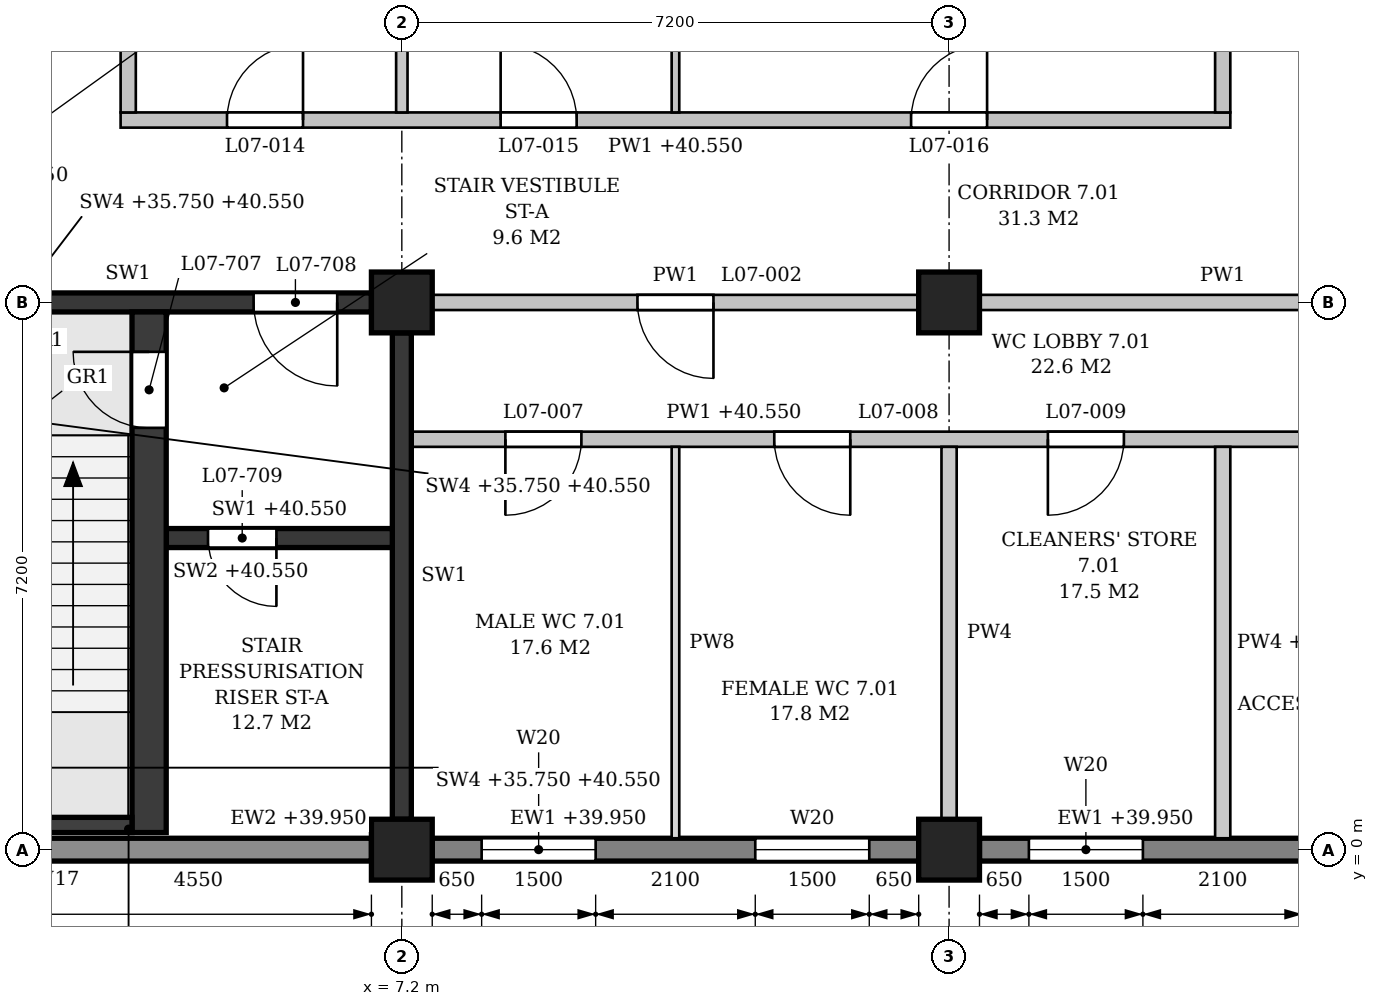
"""IFC4 building model, lengths in metres.
Left out: names, types, materials, properties, quantities, classifications, styles, units other than length and angle.
Written with IfcOpenShell. Run it as: python <this file> out.ifc"""

import sys

from ifc_helpers import new_model, si_unit, direction, frame, frame_2d, origin, origin_2d, place, context, subcontext, project, spatial, polyline, rectangle, outline, extrude, element, fill, save


model = new_model("IFC4")
c1 = context("Model", 3, precision=1e-05, world=origin(), true_north=direction((0.0, 1.0)))
c2 = subcontext(c1, "Body", "Model", "MODEL_VIEW")
j1 = project(units=[si_unit("LENGTHUNIT", "METRE"), si_unit("PLANEANGLEUNIT", "RADIAN")], contexts=[c1])
p1 = place(None, origin())
s1 = spatial("IfcSite", under=j1, at=p1, CompositionType="ELEMENT")
p2 = place(p1, origin())
s2 = spatial("IfcBuilding", under=s1, at=p2, CompositionType="ELEMENT")
p3 = place(p2, frame((0.0, 0.0, 36.0)))
s3 = spatial("IfcBuildingStorey", under=s2, at=p3, CompositionType="ELEMENT", Elevation=36.0)
for number, where, z_axis, x_axis in (
    (1, (7.2, 0.0, 0.0), (0.0, 0.0, 1.0), (1.0, 0.0, 0.0)),
    (2, (7.2, 7.2, 0.0), (0.0, 0.0, 1.0), (1.0, 0.0, 0.0)),
    (3, (14.4, 0.0, 0.0), (0.0, 0.0, 1.0), (1.0, 0.0, 0.0)),
    (4, (14.4, 7.2, 0.0), (0.0, 0.0, 1.0), (1.0, 0.0, 0.0)),
):
    element("IfcColumn", number, at=place(p3, frame(where, z_axis=z_axis, x_axis=x_axis)), inside=s3, PredefinedType="COLUMN", context=c2, shape_type="SweptSolid", body=[
        extrude(rectangle(XDim=0.8, YDim=0.8, at=origin_2d()), origin(), (0.0, 0.0, 1.0), 4.8),
    ])
p4 = place(p3, frame((0.4, 0.0, 0.0), z_axis=(0.0, 0.0, 1.0), x_axis=(1.0, 0.0, 0.0)))
e5 = element("IfcWall", 5, at=p4, inside=s3, PredefinedType="STANDARD", context=c2, shape_type="SweptSolid", body=[
    extrude(rectangle(XDim=6.4, YDim=0.3, at=frame_2d((3.2, 0.0))), origin(), (0.0, 0.0, 1.0), 3.95),
])
p5 = place(p4, frame((0.95, 0.0, 0.9)))
e6 = element("IfcOpeningElement", 6, at=p5, cuts=e5, PredefinedType="OPENING", context=c2, shape_type="SweptSolid", body=[
    extrude(outline(polyline([(0.0, 0.0), (0.9, 0.0), (0.9, 2.55), (0.45, 3.0), (0.0, 2.55), (0.0, 0.0)])), frame((0.0, 0.16, 0.0), z_axis=(0.0, -1.0, 0.0), x_axis=(1.0, 0.0, 0.0)), (0.0, 0.0, 1.0), 0.32),
])
p6 = place(p3, frame((7.6, 0.0, 0.0), z_axis=(0.0, 0.0, 1.0), x_axis=(1.0, 0.0, 0.0)))
e7 = element("IfcWall", 7, at=p6, inside=s3, PredefinedType="STANDARD", context=c2, shape_type="SweptSolid", body=[
    extrude(rectangle(XDim=6.4, YDim=0.3, at=frame_2d((3.2, 0.0))), origin(), (0.0, 0.0, 1.0), 3.95),
])
p7 = place(p6, frame((0.65, 0.0, 0.9)))
e8 = element("IfcOpeningElement", 8, at=p7, cuts=e7, PredefinedType="OPENING", context=c2, shape_type="SweptSolid", body=[
    extrude(outline(polyline([(0.0, 0.0), (1.5, 0.0), (1.5, 2.25), (0.75, 3.0), (0.0, 2.25), (0.0, 0.0)])), frame((0.0, 0.16, 0.0), z_axis=(0.0, -1.0, 0.0), x_axis=(1.0, 0.0, 0.0)), (0.0, 0.0, 1.0), 0.32),
])
p8 = place(p6, frame((4.25, 0.0, 0.9)))
e9 = element("IfcOpeningElement", 9, at=p8, cuts=e7, PredefinedType="OPENING", context=c2, shape_type="SweptSolid", body=[
    extrude(outline(polyline([(0.0, 0.0), (1.5, 0.0), (1.5, 2.25), (0.75, 3.0), (0.0, 2.25), (0.0, 0.0)])), frame((0.0, 0.16, 0.0), z_axis=(0.0, -1.0, 0.0), x_axis=(1.0, 0.0, 0.0)), (0.0, 0.0, 1.0), 0.32),
])
p9 = place(p3, frame((14.8, 0.0, 0.0), z_axis=(0.0, 0.0, 1.0), x_axis=(1.0, 0.0, 0.0)))
e10 = element("IfcWall", 10, at=p9, inside=s3, PredefinedType="STANDARD", context=c2, shape_type="SweptSolid", body=[
    extrude(rectangle(XDim=6.4, YDim=0.3, at=frame_2d((3.2, 0.0))), origin(), (0.0, 0.0, 1.0), 3.95),
])
p10 = place(p9, frame((0.65, 0.0, 0.9)))
e11 = element("IfcOpeningElement", 11, at=p10, cuts=e10, PredefinedType="OPENING", context=c2, shape_type="SweptSolid", body=[
    extrude(outline(polyline([(0.0, 0.0), (1.5, 0.0), (1.5, 2.25), (0.75, 3.0), (0.0, 2.25), (0.0, 0.0)])), frame((0.0, 0.16, 0.0), z_axis=(0.0, -1.0, 0.0), x_axis=(1.0, 0.0, 0.0)), (0.0, 0.0, 1.0), 0.32),
])
p11 = place(p9, frame((4.25, 0.0, 0.9)))
e12 = element("IfcOpeningElement", 12, at=p11, cuts=e10, PredefinedType="OPENING", context=c2, shape_type="SweptSolid", body=[
    extrude(outline(polyline([(0.0, 0.0), (1.5, 0.0), (1.5, 2.25), (0.75, 3.0), (0.0, 2.25), (0.0, 0.0)])), frame((0.0, 0.16, 0.0), z_axis=(0.0, -1.0, 0.0), x_axis=(1.0, 0.0, 0.0)), (0.0, 0.0, 1.0), 0.32),
])
p12 = place(p3, frame((0.4, 7.2, 0.0), z_axis=(0.0, 0.0, 1.0), x_axis=(1.0, 0.0, 0.0)))
e13 = element("IfcWall", 13, at=p12, inside=s3, PredefinedType="SHEAR", context=c2, shape_type="SweptSolid", body=[
    extrude(rectangle(XDim=6.4, YDim=0.25, at=frame_2d((3.2, 0.0))), origin(), (0.0, 0.0, 1.0), 3.85),
])
p13 = place(p12, frame((4.85, 0.0, 0.0)))
e14 = element("IfcOpeningElement", 14, at=p13, cuts=e13, PredefinedType="OPENING", context=c2, shape_type="SweptSolid", body=[
    extrude(rectangle(XDim=1.1, YDim=2.1, at=frame_2d((0.55, 1.05))), frame((0.0, 0.135, 0.0), z_axis=(0.0, -1.0, 0.0), x_axis=(1.0, 0.0, 0.0)), (0.0, 0.0, 1.0), 0.27),
])
p14 = place(p3, frame((7.2, 0.4, 0.0), z_axis=(0.0, 0.0, 1.0), x_axis=(0.0, 1.0, 0.0)))
e15 = element("IfcWall", 15, at=p14, inside=s3, PredefinedType="SHEAR", context=c2, shape_type="SweptSolid", body=[
    extrude(rectangle(XDim=6.4, YDim=0.25, at=frame_2d((3.2, 0.0))), origin(), (0.0, 0.0, 1.0), 3.85),
])
p15 = place(p3, frame((2.25, 0.325, -0.25), z_axis=(0.0, 0.0, 1.0), x_axis=(1.0, 0.0, 0.0)))
e16 = element("IfcWall", 16, at=p15, inside=s3, PredefinedType="SHEAR", context=c2, shape_type="SweptSolid", body=[
    extrude(rectangle(XDim=1.4, YDim=0.2, at=frame_2d((0.7, 0.0))), origin(), (0.0, 0.0, 1.0), 4.8),
])
p16 = place(p3, frame((3.875, 0.225, 0.0), z_axis=(0.0, 0.0, 1.0), x_axis=(0.0, 1.0, 0.0)))
e17 = element("IfcWall", 17, at=p16, inside=s3, PredefinedType="SHEAR", context=c2, shape_type="SweptSolid", body=[
    extrude(rectangle(XDim=6.85, YDim=0.45, at=frame_2d((3.425, 0.0))), origin(), (0.0, 0.0, 1.0), 4.55),
])
p17 = place(p16, frame((5.325, 0.0, 0.0)))
e18 = element("IfcOpeningElement", 18, at=p17, cuts=e17, PredefinedType="OPENING", context=c2, shape_type="SweptSolid", body=[
    extrude(rectangle(XDim=1.0, YDim=2.1, at=frame_2d((0.5, 1.05))), frame((0.0, 0.235, 0.0), z_axis=(0.0, -1.0, 0.0), x_axis=(1.0, 0.0, 0.0)), (0.0, 0.0, 1.0), 0.47),
])
p18 = place(p3, frame((4.1, 4.1, 0.0), z_axis=(0.0, 0.0, 1.0), x_axis=(1.0, 0.0, 0.0)))
e19 = element("IfcWall", 19, at=p18, inside=s3, PredefinedType="SHEAR", context=c2, shape_type="SweptSolid", body=[
    extrude(rectangle(XDim=2.975, YDim=0.25, at=frame_2d((1.487, 0.0))), origin(), (0.0, 0.0, 1.0), 4.55),
])
p19 = place(p18, frame((0.55, 0.0, 0.0)))
e20 = element("IfcOpeningElement", 20, at=p19, cuts=e19, PredefinedType="OPENING", context=c2, shape_type="SweptSolid", body=[
    extrude(rectangle(XDim=0.9, YDim=2.1, at=frame_2d((0.45, 1.05))), frame((0.0, 0.135, 0.0), z_axis=(0.0, -1.0, 0.0), x_axis=(1.0, 0.0, 0.0)), (0.0, 0.0, 1.0), 0.27),
])
p20 = place(p3, frame((7.325, 5.4, 0.0), z_axis=(0.0, 0.0, 1.0), x_axis=(1.0, 0.0, 0.0)))
e21 = element("IfcWall", 21, at=p20, inside=s3, PredefinedType="PARTITIONING", context=c2, shape_type="SweptSolid", body=[
    extrude(outline(polyline([(0.0, 0.0), (14.15, 0.0), (14.15, 3.85), (14.05, 3.85), (14.05, 4.55), (7.3, 4.55), (7.3, 3.85), (6.85, 3.85), (6.85, 4.55), (0.1, 4.55), (0.1, 3.85), (0.0, 3.85), (0.0, 0.0)])), frame((0.0, 0.1, 0.0), z_axis=(0.0, -1.0, 0.0), x_axis=(1.0, 0.0, 0.0)), (0.0, 0.0, 1.0), 0.2),
])
p21 = place(p20, frame((1.238, 0.0, 0.0)))
e22 = element("IfcOpeningElement", 22, at=p21, cuts=e21, PredefinedType="OPENING", context=c2, shape_type="SweptSolid", body=[
    extrude(rectangle(XDim=1.0, YDim=2.1, at=frame_2d((0.5, 1.05))), frame((0.0, 0.11, 0.0), z_axis=(0.0, -1.0, 0.0), x_axis=(1.0, 0.0, 0.0)), (0.0, 0.0, 1.0), 0.22),
])
p22 = place(p20, frame((4.775, 0.0, 0.0)))
e23 = element("IfcOpeningElement", 23, at=p22, cuts=e21, PredefinedType="OPENING", context=c2, shape_type="SweptSolid", body=[
    extrude(rectangle(XDim=1.0, YDim=2.1, at=frame_2d((0.5, 1.05))), frame((0.0, 0.11, 0.0), z_axis=(0.0, -1.0, 0.0), x_axis=(1.0, 0.0, 0.0)), (0.0, 0.0, 1.0), 0.22),
])
p23 = place(p20, frame((8.375, 0.0, 0.0)))
e24 = element("IfcOpeningElement", 24, at=p23, cuts=e21, PredefinedType="OPENING", context=c2, shape_type="SweptSolid", body=[
    extrude(rectangle(XDim=1.0, YDim=2.1, at=frame_2d((0.5, 1.05))), frame((0.0, 0.11, 0.0), z_axis=(0.0, -1.0, 0.0), x_axis=(1.0, 0.0, 0.0)), (0.0, 0.0, 1.0), 0.22),
])
p24 = place(p20, frame((11.913, 0.0, 0.0)))
e25 = element("IfcOpeningElement", 25, at=p24, cuts=e21, PredefinedType="OPENING", context=c2, shape_type="SweptSolid", body=[
    extrude(rectangle(XDim=1.0, YDim=2.1, at=frame_2d((0.5, 1.05))), frame((0.0, 0.11, 0.0), z_axis=(0.0, -1.0, 0.0), x_axis=(1.0, 0.0, 0.0)), (0.0, 0.0, 1.0), 0.22),
])
p25 = place(p3, frame((7.6, 7.2, 0.0), z_axis=(0.0, 0.0, 1.0), x_axis=(1.0, 0.0, 0.0)))
e26 = element("IfcWall", 26, at=p25, inside=s3, PredefinedType="PARTITIONING", context=c2, shape_type="SweptSolid", body=[
    extrude(rectangle(XDim=6.4, YDim=0.2, at=frame_2d((3.2, 0.0))), origin(), (0.0, 0.0, 1.0), 3.85),
])
p26 = place(p25, frame((2.7, 0.0, 0.0)))
e27 = element("IfcOpeningElement", 27, at=p26, cuts=e26, PredefinedType="OPENING", context=c2, shape_type="SweptSolid", body=[
    extrude(rectangle(XDim=1.0, YDim=2.1, at=frame_2d((0.5, 1.05))), frame((0.0, 0.11, 0.0), z_axis=(0.0, -1.0, 0.0), x_axis=(1.0, 0.0, 0.0)), (0.0, 0.0, 1.0), 0.22),
])
p27 = place(p3, frame((14.8, 7.2, 0.0), z_axis=(0.0, 0.0, 1.0), x_axis=(1.0, 0.0, 0.0)))
e28 = element("IfcWall", 28, at=p27, inside=s3, PredefinedType="PARTITIONING", context=c2, shape_type="SweptSolid", body=[
    extrude(rectangle(XDim=6.4, YDim=0.2, at=frame_2d((3.2, 0.0))), origin(), (0.0, 0.0, 1.0), 3.85),
])
p28 = place(p27, frame((4.3, 0.0, 0.0)))
e29 = element("IfcOpeningElement", 29, at=p28, cuts=e28, PredefinedType="OPENING", context=c2, shape_type="SweptSolid", body=[
    extrude(rectangle(XDim=1.0, YDim=2.1, at=frame_2d((0.5, 1.05))), frame((0.0, 0.11, 0.0), z_axis=(0.0, -1.0, 0.0), x_axis=(1.0, 0.0, 0.0)), (0.0, 0.0, 1.0), 0.22),
])
p29 = place(p3, frame((3.5, 9.6, 0.0), z_axis=(0.0, 0.0, 1.0), x_axis=(1.0, 0.0, 0.0)))
e30 = element("IfcWall", 30, at=p29, inside=s3, PredefinedType="PARTITIONING", context=c2, shape_type="SweptSolid", body=[
    extrude(outline(polyline([(0.0, 0.0), (14.6, 0.0), (14.6, 4.55), (11.125, 4.55), (11.125, 3.85), (10.675, 3.85), (10.675, 4.55), (3.925, 4.55), (3.925, 3.85), (3.475, 3.85), (3.475, 4.55), (0.0, 4.55), (0.0, 0.0)])), frame((0.0, 0.1, 0.0), z_axis=(0.0, -1.0, 0.0), x_axis=(1.0, 0.0, 0.0)), (0.0, 0.0, 1.0), 0.2),
])
p30 = place(p29, frame((1.4, 0.0, 0.0)))
e31 = element("IfcOpeningElement", 31, at=p30, cuts=e30, PredefinedType="OPENING", context=c2, shape_type="SweptSolid", body=[
    extrude(rectangle(XDim=1.0, YDim=2.1, at=frame_2d((0.5, 1.05))), frame((0.0, 0.11, 0.0), z_axis=(0.0, -1.0, 0.0), x_axis=(1.0, 0.0, 0.0)), (0.0, 0.0, 1.0), 0.22),
])
p31 = place(p29, frame((5.0, 0.0, 0.0)))
e32 = element("IfcOpeningElement", 32, at=p31, cuts=e30, PredefinedType="OPENING", context=c2, shape_type="SweptSolid", body=[
    extrude(rectangle(XDim=1.0, YDim=2.1, at=frame_2d((0.5, 1.05))), frame((0.0, 0.11, 0.0), z_axis=(0.0, -1.0, 0.0), x_axis=(1.0, 0.0, 0.0)), (0.0, 0.0, 1.0), 0.22),
])
p32 = place(p29, frame((10.4, 0.0, 0.0)))
e33 = element("IfcOpeningElement", 33, at=p32, cuts=e30, PredefinedType="OPENING", context=c2, shape_type="SweptSolid", body=[
    extrude(rectangle(XDim=1.0, YDim=2.1, at=frame_2d((0.5, 1.05))), frame((0.0, 0.11, 0.0), z_axis=(0.0, -1.0, 0.0), x_axis=(1.0, 0.0, 0.0)), (0.0, 0.0, 1.0), 0.22),
])
p33 = place(p3, frame((3.6, 9.7, 0.0), z_axis=(0.0, 0.0, 1.0), x_axis=(0.0, 1.0, 0.0)))
e34 = element("IfcWall", 34, at=p33, inside=s3, PredefinedType="PARTITIONING", context=c2, shape_type="SweptSolid", body=[
    extrude(rectangle(XDim=1.1, YDim=0.2, at=frame_2d((0.55, 0.0))), origin(), (0.0, 0.0, 1.0), 4.55),
])
p34 = place(p3, frame((7.2, 9.7, 0.0), z_axis=(0.0, 0.0, 1.0), x_axis=(0.0, 1.0, 0.0)))
e35 = element("IfcWall", 35, at=p34, inside=s3, PredefinedType="PARTITIONING", context=c2, shape_type="SweptSolid", body=[
    extrude(rectangle(XDim=4.3, YDim=0.15, at=frame_2d((2.15, 0.0))), origin(), (0.0, 0.0, 1.0), 3.85),
])
p35 = place(p3, frame((10.8, 0.15, 0.0), z_axis=(0.0, 0.0, 1.0), x_axis=(0.0, 1.0, 0.0)))
e36 = element("IfcWall", 36, at=p35, inside=s3, PredefinedType="PARTITIONING", context=c2, shape_type="SweptSolid", body=[
    extrude(rectangle(XDim=5.15, YDim=0.1, at=frame_2d((2.575, 0.0))), origin(), (0.0, 0.0, 1.0), 3.85),
])
p36 = place(p3, frame((10.8, 9.7, 0.0), z_axis=(0.0, 0.0, 1.0), x_axis=(0.0, 1.0, 0.0)))
e37 = element("IfcWall", 37, at=p36, inside=s3, PredefinedType="PARTITIONING", context=c2, shape_type="SweptSolid", body=[
    extrude(rectangle(XDim=3.5, YDim=0.1, at=frame_2d((1.75, 0.0))), origin(), (0.0, 0.0, 1.0), 3.85),
])
p37 = place(p3, frame((14.4, 0.4, 0.0), z_axis=(0.0, 0.0, 1.0), x_axis=(0.0, 1.0, 0.0)))
e38 = element("IfcWall", 38, at=p37, inside=s3, PredefinedType="PARTITIONING", context=c2, shape_type="SweptSolid", body=[
    extrude(rectangle(XDim=4.9, YDim=0.2, at=frame_2d((2.45, 0.0))), origin(), (0.0, 0.0, 1.0), 3.85),
])
p38 = place(p3, frame((18.0, 0.15, 0.0), z_axis=(0.0, 0.0, 1.0), x_axis=(0.0, 1.0, 0.0)))
e39 = element("IfcWall", 39, at=p38, inside=s3, PredefinedType="PARTITIONING", context=c2, shape_type="SweptSolid", body=[
    extrude(outline(polyline([(0.0, 0.0), (5.15, 0.0), (5.15, 4.55), (0.05, 4.55), (0.05, 3.95), (0.0, 3.95), (0.0, 0.0)])), frame((0.0, 0.1, 0.0), z_axis=(0.0, -1.0, 0.0), x_axis=(1.0, 0.0, 0.0)), (0.0, 0.0, 1.0), 0.2),
])
p39 = place(p3, frame((18.0, 9.7, 0.0), z_axis=(0.0, 0.0, 1.0), x_axis=(0.0, 1.0, 0.0)))
e40 = element("IfcWall", 40, at=p39, inside=s3, PredefinedType="PARTITIONING", context=c2, shape_type="SweptSolid", body=[
    extrude(outline(polyline([(0.0, 0.0), (7.1, 0.0), (7.1, 4.55), (4.925, 4.55), (4.925, 3.85), (4.475, 3.85), (4.475, 4.55), (0.0, 4.55), (0.0, 0.0)])), frame((0.0, 0.1, 0.0), z_axis=(0.0, -1.0, 0.0), x_axis=(1.0, 0.0, 0.0)), (0.0, 0.0, 1.0), 0.2),
])
p40 = place(p7, origin())
e41 = element("IfcWindow", 41, at=p40, inside=s3, PartitioningType="SINGLE_PANEL", PredefinedType="WINDOW", context=c2, shape_type="SweptSolid", body=[
    extrude(outline(polyline([(0.0, 0.0), (1.5, 0.0), (1.5, 2.25), (0.75, 3.0), (0.0, 2.25), (0.0, 0.0)])), frame((0.0, 0.03, 0.0), z_axis=(0.0, -1.0, 0.0), x_axis=(1.0, 0.0, 0.0)), (0.0, 0.0, 1.0), 0.06),
])
fill(e8, e41)
p41 = place(p8, origin())
e42 = element("IfcWindow", 42, at=p41, inside=s3, PartitioningType="SINGLE_PANEL", PredefinedType="WINDOW", context=c2, shape_type="SweptSolid", body=[
    extrude(outline(polyline([(0.0, 0.0), (1.5, 0.0), (1.5, 2.25), (0.75, 3.0), (0.0, 2.25), (0.0, 0.0)])), frame((0.0, 0.03, 0.0), z_axis=(0.0, -1.0, 0.0), x_axis=(1.0, 0.0, 0.0)), (0.0, 0.0, 1.0), 0.06),
])
fill(e9, e42)
p42 = place(p10, origin())
e43 = element("IfcWindow", 43, at=p42, inside=s3, PartitioningType="SINGLE_PANEL", PredefinedType="WINDOW", context=c2, shape_type="SweptSolid", body=[
    extrude(outline(polyline([(0.0, 0.0), (1.5, 0.0), (1.5, 2.25), (0.75, 3.0), (0.0, 2.25), (0.0, 0.0)])), frame((0.0, 0.03, 0.0), z_axis=(0.0, -1.0, 0.0), x_axis=(1.0, 0.0, 0.0)), (0.0, 0.0, 1.0), 0.06),
])
fill(e11, e43)
p43 = place(p17, origin())
e44 = element("IfcDoor", 44, at=p43, inside=s3, OperationType="SINGLE_SWING_RIGHT", PredefinedType="DOOR", context=c2, shape_type="SweptSolid", body=[
    extrude(rectangle(XDim=1.0, YDim=2.1, at=frame_2d((0.5, 1.05))), frame((0.0, 0.025, 0.0), z_axis=(0.0, -1.0, 0.0), x_axis=(1.0, 0.0, 0.0)), (0.0, 0.0, 1.0), 0.05),
])
fill(e18, e44)
p44 = place(p13, frame((1.1, 0.0, 0.0), z_axis=(0.0, 0.0, 1.0), x_axis=(-1.0, 0.0, 0.0)))
e45 = element("IfcDoor", 45, at=p44, inside=s3, OperationType="SINGLE_SWING_LEFT", PredefinedType="DOOR", context=c2, shape_type="SweptSolid", body=[
    extrude(rectangle(XDim=1.1, YDim=2.1, at=frame_2d((0.55, 1.05))), frame((0.0, 0.025, 0.0), z_axis=(0.0, -1.0, 0.0), x_axis=(1.0, 0.0, 0.0)), (0.0, 0.0, 1.0), 0.05),
])
fill(e14, e45)
p45 = place(p19, frame((0.9, 0.0, 0.0), z_axis=(0.0, 0.0, 1.0), x_axis=(-1.0, 0.0, 0.0)))
e46 = element("IfcDoor", 46, at=p45, inside=s3, OperationType="SINGLE_SWING_LEFT", PredefinedType="DOOR", context=c2, shape_type="SweptSolid", body=[
    extrude(rectangle(XDim=0.9, YDim=2.1, at=frame_2d((0.45, 1.05))), frame((0.0, 0.025, 0.0), z_axis=(0.0, -1.0, 0.0), x_axis=(1.0, 0.0, 0.0)), (0.0, 0.0, 1.0), 0.05),
])
fill(e20, e46)
p46 = place(p26, frame((1.0, 0.0, 0.0), z_axis=(0.0, 0.0, 1.0), x_axis=(-1.0, 0.0, 0.0)))
e47 = element("IfcDoor", 47, at=p46, inside=s3, OperationType="SINGLE_SWING_LEFT", PredefinedType="DOOR", context=c2, shape_type="SweptSolid", body=[
    extrude(rectangle(XDim=1.0, YDim=2.1, at=frame_2d((0.5, 1.05))), frame((0.0, 0.025, 0.0), z_axis=(0.0, -1.0, 0.0), x_axis=(1.0, 0.0, 0.0)), (0.0, 0.0, 1.0), 0.05),
])
fill(e27, e47)
p47 = place(p21, frame((1.0, 0.0, 0.0), z_axis=(0.0, 0.0, 1.0), x_axis=(-1.0, 0.0, 0.0)))
e48 = element("IfcDoor", 48, at=p47, inside=s3, OperationType="SINGLE_SWING_RIGHT", PredefinedType="DOOR", context=c2, shape_type="SweptSolid", body=[
    extrude(rectangle(XDim=1.0, YDim=2.1, at=frame_2d((0.5, 1.05))), frame((0.0, 0.025, 0.0), z_axis=(0.0, -1.0, 0.0), x_axis=(1.0, 0.0, 0.0)), (0.0, 0.0, 1.0), 0.05),
])
fill(e22, e48)
p48 = place(p22, frame((1.0, 0.0, 0.0), z_axis=(0.0, 0.0, 1.0), x_axis=(-1.0, 0.0, 0.0)))
e49 = element("IfcDoor", 49, at=p48, inside=s3, OperationType="SINGLE_SWING_LEFT", PredefinedType="DOOR", context=c2, shape_type="SweptSolid", body=[
    extrude(rectangle(XDim=1.0, YDim=2.1, at=frame_2d((0.5, 1.05))), frame((0.0, 0.025, 0.0), z_axis=(0.0, -1.0, 0.0), x_axis=(1.0, 0.0, 0.0)), (0.0, 0.0, 1.0), 0.05),
])
fill(e23, e49)
p49 = place(p23, frame((1.0, 0.0, 0.0), z_axis=(0.0, 0.0, 1.0), x_axis=(-1.0, 0.0, 0.0)))
e50 = element("IfcDoor", 50, at=p49, inside=s3, OperationType="SINGLE_SWING_RIGHT", PredefinedType="DOOR", context=c2, shape_type="SweptSolid", body=[
    extrude(rectangle(XDim=1.0, YDim=2.1, at=frame_2d((0.5, 1.05))), frame((0.0, 0.025, 0.0), z_axis=(0.0, -1.0, 0.0), x_axis=(1.0, 0.0, 0.0)), (0.0, 0.0, 1.0), 0.05),
])
fill(e24, e50)
p50 = place(p30, origin())
e51 = element("IfcDoor", 51, at=p50, inside=s3, OperationType="SINGLE_SWING_RIGHT", PredefinedType="DOOR", context=c2, shape_type="SweptSolid", body=[
    extrude(rectangle(XDim=1.0, YDim=2.1, at=frame_2d((0.5, 1.05))), frame((0.0, 0.025, 0.0), z_axis=(0.0, -1.0, 0.0), x_axis=(1.0, 0.0, 0.0)), (0.0, 0.0, 1.0), 0.05),
])
fill(e31, e51)
p51 = place(p31, origin())
e52 = element("IfcDoor", 52, at=p51, inside=s3, OperationType="SINGLE_SWING_LEFT", PredefinedType="DOOR", context=c2, shape_type="SweptSolid", body=[
    extrude(rectangle(XDim=1.0, YDim=2.1, at=frame_2d((0.5, 1.05))), frame((0.0, 0.025, 0.0), z_axis=(0.0, -1.0, 0.0), x_axis=(1.0, 0.0, 0.0)), (0.0, 0.0, 1.0), 0.05),
])
fill(e32, e52)
p52 = place(p32, origin())
e53 = element("IfcDoor", 53, at=p52, inside=s3, OperationType="SINGLE_SWING_RIGHT", PredefinedType="DOOR", context=c2, shape_type="SweptSolid", body=[
    extrude(rectangle(XDim=1.0, YDim=2.1, at=frame_2d((0.5, 1.05))), frame((0.0, 0.025, 0.0), z_axis=(0.0, -1.0, 0.0), x_axis=(1.0, 0.0, 0.0)), (0.0, 0.0, 1.0), 0.05),
])
fill(e33, e53)
save(model, sys.argv[1])
